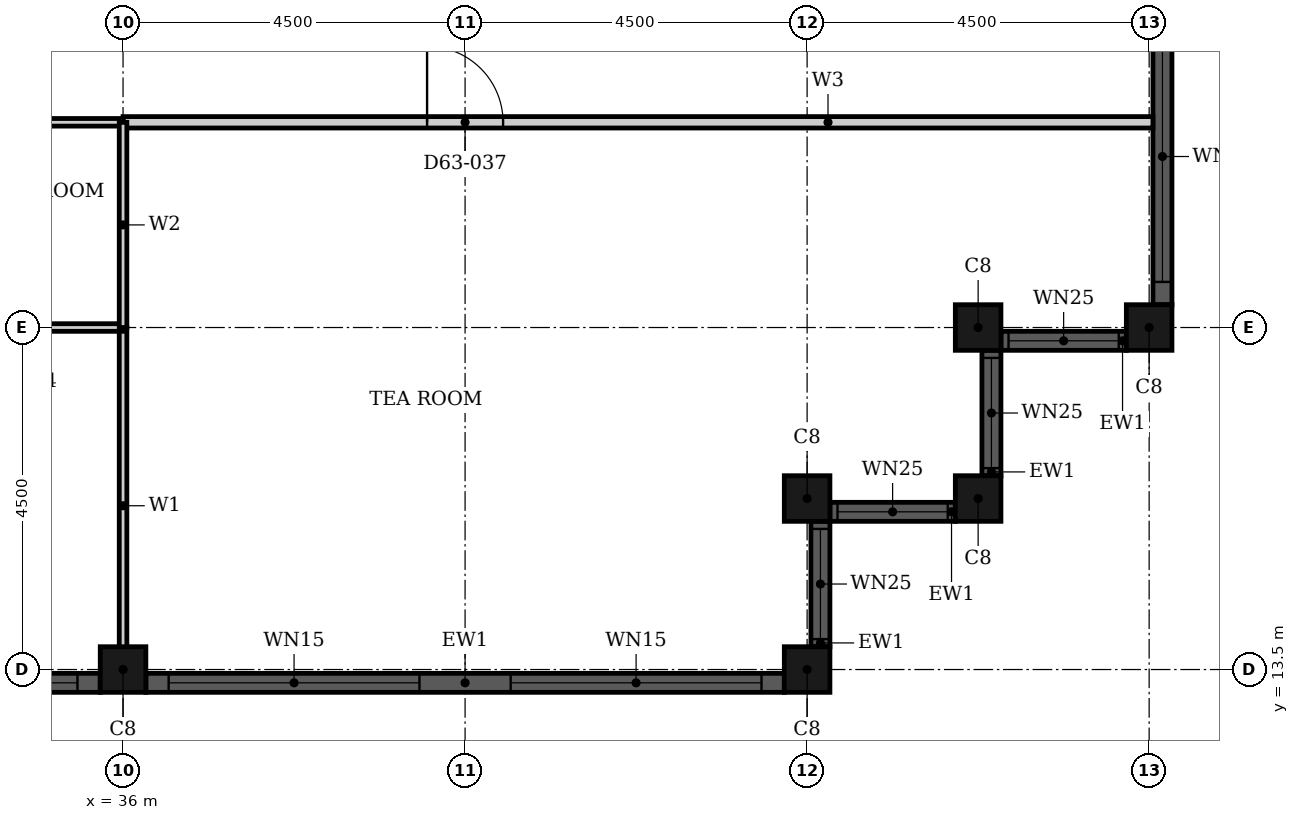
"""IFC4 building model, lengths in metres.
Left out: names, types, materials, properties, quantities, classifications, styles, units other than length and angle.
Written with IfcOpenShell. Run it as: python <this file> out.ifc"""

import sys

from ifc_helpers import new_model, si_unit, direction, frame, frame_2d, origin, origin_2d, place, context, subcontext, project, spatial, rectangle, hollow_rectangle, extrude, element, fill, save


model = new_model("IFC4")
c1 = context("Model", 3, precision=1e-05, world=origin(), true_north=direction((0.0, 1.0)))
c2 = subcontext(c1, "Body", "Model", "MODEL_VIEW")
j1 = project(units=[si_unit("LENGTHUNIT", "METRE"), si_unit("PLANEANGLEUNIT", "RADIAN")], contexts=[c1])
p1 = place(None, origin())
s1 = spatial("IfcSite", under=j1, at=p1, CompositionType="ELEMENT")
p2 = place(p1, origin())
s2 = spatial("IfcBuilding", under=s1, at=p2, CompositionType="ELEMENT")
p3 = place(p2, frame((0.0, 0.0, 249.0)))
s3 = spatial("IfcBuildingStorey", under=s2, at=p3, CompositionType="ELEMENT", Elevation=249.0)
for number, where, z_axis, x_axis in (
    (1, (36.0, 13.5, 0.0), (0.0, 0.0, 1.0), (1.0, 0.0, 0.0)),
    (2, (45.0, 13.5, 0.0), (0.0, 0.0, 1.0), (1.0, 0.0, 0.0)),
    (3, (45.0, 15.75, 0.0), (0.0, 0.0, 1.0), (1.0, 0.0, 0.0)),
    (4, (47.25, 15.75, 0.0), (0.0, 0.0, 1.0), (1.0, 0.0, 0.0)),
    (5, (47.25, 18.0, 0.0), (0.0, 0.0, 1.0), (1.0, 0.0, 0.0)),
    (6, (49.5, 18.0, 0.0), (0.0, 0.0, 1.0), (1.0, 0.0, 0.0)),
):
    element("IfcColumn", number, at=place(p3, frame(where, z_axis=z_axis, x_axis=x_axis)), inside=s3, PredefinedType="COLUMN", context=c2, shape_type="SweptSolid", body=[
        extrude(hollow_rectangle(XDim=0.6, YDim=0.6, WallThickness=0.02, at=origin_2d()), origin(), (0.0, 0.0, 1.0), 3.7),
    ])
p4 = place(p3, frame((27.3, 13.325, 0.0), z_axis=(0.0, 0.0, 1.0), x_axis=(1.0, 0.0, 0.0)))
e7 = element("IfcWall", 7, at=p4, inside=s3, PredefinedType="SOLIDWALL", context=c2, shape_type="SweptSolid", body=[
    extrude(rectangle(XDim=8.4, YDim=0.25, at=frame_2d((4.2, 0.0))), origin(), (0.0, 0.0, 1.0), 3.7),
])
p5 = place(p4, frame((0.3, 0.0, 0.45)))
e8 = element("IfcOpeningElement", 8, at=p5, cuts=e7, PredefinedType="OPENING", context=c2, shape_type="SweptSolid", body=[
    extrude(rectangle(XDim=3.3, YDim=2.3, at=frame_2d((1.65, 1.15))), frame((0.0, 0.135, 0.0), z_axis=(0.0, -1.0, 0.0), x_axis=(1.0, 0.0, 0.0)), (0.0, 0.0, 1.0), 0.27),
])
p6 = place(p4, frame((4.8, 0.0, 0.45)))
e9 = element("IfcOpeningElement", 9, at=p6, cuts=e7, PredefinedType="OPENING", context=c2, shape_type="SweptSolid", body=[
    extrude(rectangle(XDim=3.3, YDim=2.3, at=frame_2d((1.65, 1.15))), frame((0.0, 0.135, 0.0), z_axis=(0.0, -1.0, 0.0), x_axis=(1.0, 0.0, 0.0)), (0.0, 0.0, 1.0), 0.27),
])
p7 = place(p3, frame((36.3, 13.325, 0.0), z_axis=(0.0, 0.0, 1.0), x_axis=(1.0, 0.0, 0.0)))
e10 = element("IfcWall", 10, at=p7, inside=s3, PredefinedType="SOLIDWALL", context=c2, shape_type="SweptSolid", body=[
    extrude(rectangle(XDim=8.4, YDim=0.25, at=frame_2d((4.2, 0.0))), origin(), (0.0, 0.0, 1.0), 3.7),
])
p8 = place(p7, frame((0.3, 0.0, 0.45)))
e11 = element("IfcOpeningElement", 11, at=p8, cuts=e10, PredefinedType="OPENING", context=c2, shape_type="SweptSolid", body=[
    extrude(rectangle(XDim=3.3, YDim=2.3, at=frame_2d((1.65, 1.15))), frame((0.0, 0.135, 0.0), z_axis=(0.0, -1.0, 0.0), x_axis=(1.0, 0.0, 0.0)), (0.0, 0.0, 1.0), 0.27),
])
p9 = place(p7, frame((4.8, 0.0, 0.45)))
e12 = element("IfcOpeningElement", 12, at=p9, cuts=e10, PredefinedType="OPENING", context=c2, shape_type="SweptSolid", body=[
    extrude(rectangle(XDim=3.3, YDim=2.3, at=frame_2d((1.65, 1.15))), frame((0.0, 0.135, 0.0), z_axis=(0.0, -1.0, 0.0), x_axis=(1.0, 0.0, 0.0)), (0.0, 0.0, 1.0), 0.27),
])
p10 = place(p3, frame((45.175, 13.8, 0.0), z_axis=(0.0, 0.0, 1.0), x_axis=(0.0, 1.0, 0.0)))
e13 = element("IfcWall", 13, at=p10, inside=s3, PredefinedType="SOLIDWALL", context=c2, shape_type="SweptSolid", body=[
    extrude(rectangle(XDim=1.65, YDim=0.25, at=frame_2d((0.825, 0.0))), origin(), (0.0, 0.0, 1.0), 3.7),
])
p11 = place(p10, frame((0.1, 0.0, 0.9)))
e14 = element("IfcOpeningElement", 14, at=p11, cuts=e13, PredefinedType="OPENING", context=c2, shape_type="SweptSolid", body=[
    extrude(rectangle(XDim=1.45, YDim=1.85, at=frame_2d((0.725, 0.925))), frame((0.0, 0.135, 0.0), z_axis=(0.0, -1.0, 0.0), x_axis=(1.0, 0.0, 0.0)), (0.0, 0.0, 1.0), 0.27),
])
p12 = place(p3, frame((45.3, 15.575, 0.0), z_axis=(0.0, 0.0, 1.0), x_axis=(1.0, 0.0, 0.0)))
e15 = element("IfcWall", 15, at=p12, inside=s3, PredefinedType="SOLIDWALL", context=c2, shape_type="SweptSolid", body=[
    extrude(rectangle(XDim=1.65, YDim=0.25, at=frame_2d((0.825, 0.0))), origin(), (0.0, 0.0, 1.0), 3.7),
])
p13 = place(p12, frame((0.1, 0.0, 0.9)))
e16 = element("IfcOpeningElement", 16, at=p13, cuts=e15, PredefinedType="OPENING", context=c2, shape_type="SweptSolid", body=[
    extrude(rectangle(XDim=1.45, YDim=1.85, at=frame_2d((0.725, 0.925))), frame((0.0, 0.135, 0.0), z_axis=(0.0, -1.0, 0.0), x_axis=(1.0, 0.0, 0.0)), (0.0, 0.0, 1.0), 0.27),
])
p14 = place(p3, frame((47.425, 16.05, 0.0), z_axis=(0.0, 0.0, 1.0), x_axis=(0.0, 1.0, 0.0)))
e17 = element("IfcWall", 17, at=p14, inside=s3, PredefinedType="SOLIDWALL", context=c2, shape_type="SweptSolid", body=[
    extrude(rectangle(XDim=1.65, YDim=0.25, at=frame_2d((0.825, 0.0))), origin(), (0.0, 0.0, 1.0), 3.7),
])
p15 = place(p14, frame((0.1, 0.0, 0.9)))
e18 = element("IfcOpeningElement", 18, at=p15, cuts=e17, PredefinedType="OPENING", context=c2, shape_type="SweptSolid", body=[
    extrude(rectangle(XDim=1.45, YDim=1.85, at=frame_2d((0.725, 0.925))), frame((0.0, 0.135, 0.0), z_axis=(0.0, -1.0, 0.0), x_axis=(1.0, 0.0, 0.0)), (0.0, 0.0, 1.0), 0.27),
])
p16 = place(p3, frame((47.55, 17.825, 0.0), z_axis=(0.0, 0.0, 1.0), x_axis=(1.0, 0.0, 0.0)))
e19 = element("IfcWall", 19, at=p16, inside=s3, PredefinedType="SOLIDWALL", context=c2, shape_type="SweptSolid", body=[
    extrude(rectangle(XDim=1.65, YDim=0.25, at=frame_2d((0.825, 0.0))), origin(), (0.0, 0.0, 1.0), 3.7),
])
p17 = place(p16, frame((0.1, 0.0, 0.9)))
e20 = element("IfcOpeningElement", 20, at=p17, cuts=e19, PredefinedType="OPENING", context=c2, shape_type="SweptSolid", body=[
    extrude(rectangle(XDim=1.45, YDim=1.85, at=frame_2d((0.725, 0.925))), frame((0.0, 0.135, 0.0), z_axis=(0.0, -1.0, 0.0), x_axis=(1.0, 0.0, 0.0)), (0.0, 0.0, 1.0), 0.27),
])
p18 = place(p3, frame((49.675, 18.3, 0.0), z_axis=(0.0, 0.0, 1.0), x_axis=(0.0, 1.0, 0.0)))
e21 = element("IfcWall", 21, at=p18, inside=s3, PredefinedType="SOLIDWALL", context=c2, shape_type="SweptSolid", body=[
    extrude(rectangle(XDim=8.4, YDim=0.25, at=frame_2d((4.2, 0.0))), origin(), (0.0, 0.0, 1.0), 3.7),
])
p19 = place(p18, frame((0.3, 0.0, 0.45)))
e22 = element("IfcOpeningElement", 22, at=p19, cuts=e21, PredefinedType="OPENING", context=c2, shape_type="SweptSolid", body=[
    extrude(rectangle(XDim=3.3, YDim=2.3, at=frame_2d((1.65, 1.15))), frame((0.0, 0.135, 0.0), z_axis=(0.0, -1.0, 0.0), x_axis=(1.0, 0.0, 0.0)), (0.0, 0.0, 1.0), 0.27),
])
p20 = place(p18, frame((4.8, 0.0, 0.45)))
e23 = element("IfcOpeningElement", 23, at=p20, cuts=e21, PredefinedType="OPENING", context=c2, shape_type="SweptSolid", body=[
    extrude(rectangle(XDim=3.3, YDim=2.3, at=frame_2d((1.65, 1.15))), frame((0.0, 0.135, 0.0), z_axis=(0.0, -1.0, 0.0), x_axis=(1.0, 0.0, 0.0)), (0.0, 0.0, 1.0), 0.27),
])
p21 = place(p3, frame((36.0, 20.7, 0.0), z_axis=(0.0, 0.0, 1.0), x_axis=(1.0, 0.0, 0.0)))
e24 = element("IfcWall", 24, at=p21, inside=s3, PredefinedType="PARTITIONING", context=c2, shape_type="SweptSolid", body=[
    extrude(rectangle(XDim=13.55, YDim=0.15, at=frame_2d((6.775, 0.0))), origin(), (0.0, 0.0, 1.0), 3.4),
])
p22 = place(p21, frame((4.0, 0.0, 0.0)))
e25 = element("IfcOpeningElement", 25, at=p22, cuts=e24, PredefinedType="OPENING", context=c2, shape_type="SweptSolid", body=[
    extrude(rectangle(XDim=1.0, YDim=2.1, at=frame_2d((0.5, 1.05))), frame((0.0, 0.085, 0.0), z_axis=(0.0, -1.0, 0.0), x_axis=(1.0, 0.0, 0.0)), (0.0, 0.0, 1.0), 0.17),
])
p23 = place(p3, frame((36.0, 13.31, 0.0), z_axis=(0.0, 0.0, 1.0), x_axis=(0.0, 1.0, 0.0)))
e26 = element("IfcWall", 26, at=p23, inside=s3, PredefinedType="PARTITIONING", context=c2, shape_type="SweptSolid", body=[
    extrude(rectangle(XDim=4.69, YDim=0.1, at=frame_2d((2.345, 0.0))), origin(), (0.0, 0.0, 1.0), 3.4),
])
for number, where, z_axis, x_axis in (
    (27, (33.6, 18.0, 0.0), (0.0, 0.0, 1.0), (1.0, 0.0, 0.0)),
    (28, (33.6, 20.7, 0.0), (0.0, 0.0, 1.0), (1.0, 0.0, 0.0)),
):
    element("IfcWall", number, at=place(p3, frame(where, z_axis=z_axis, x_axis=x_axis)), inside=s3, PredefinedType="PARTITIONING", context=c2, shape_type="SweptSolid", body=[
        extrude(rectangle(XDim=2.4, YDim=0.1, at=frame_2d((1.2, 0.0))), origin(), (0.0, 0.0, 1.0), 3.4),
    ])
p24 = place(p3, frame((36.0, 18.0, 0.0), z_axis=(0.0, 0.0, 1.0), x_axis=(0.0, 1.0, 0.0)))
e29 = element("IfcWall", 29, at=p24, inside=s3, PredefinedType="PARTITIONING", context=c2, shape_type="SweptSolid", body=[
    extrude(rectangle(XDim=2.7, YDim=0.1, at=frame_2d((1.35, 0.0))), origin(), (0.0, 0.0, 1.0), 3.4),
])
p25 = place(p6, origin())
e30 = element("IfcWindow", 30, at=p25, inside=s3, PartitioningType="SINGLE_PANEL", PredefinedType="WINDOW", context=c2, shape_type="SweptSolid", body=[
    extrude(rectangle(XDim=3.3, YDim=2.3, at=frame_2d((1.65, 1.15))), frame((0.0, 0.03, 0.0), z_axis=(0.0, -1.0, 0.0), x_axis=(1.0, 0.0, 0.0)), (0.0, 0.0, 1.0), 0.06),
])
fill(e9, e30)
p26 = place(p8, origin())
e31 = element("IfcWindow", 31, at=p26, inside=s3, PartitioningType="SINGLE_PANEL", PredefinedType="WINDOW", context=c2, shape_type="SweptSolid", body=[
    extrude(rectangle(XDim=3.3, YDim=2.3, at=frame_2d((1.65, 1.15))), frame((0.0, 0.03, 0.0), z_axis=(0.0, -1.0, 0.0), x_axis=(1.0, 0.0, 0.0)), (0.0, 0.0, 1.0), 0.06),
])
fill(e11, e31)
p27 = place(p9, origin())
e32 = element("IfcWindow", 32, at=p27, inside=s3, PartitioningType="SINGLE_PANEL", PredefinedType="WINDOW", context=c2, shape_type="SweptSolid", body=[
    extrude(rectangle(XDim=3.3, YDim=2.3, at=frame_2d((1.65, 1.15))), frame((0.0, 0.03, 0.0), z_axis=(0.0, -1.0, 0.0), x_axis=(1.0, 0.0, 0.0)), (0.0, 0.0, 1.0), 0.06),
])
fill(e12, e32)
p28 = place(p11, origin())
e33 = element("IfcWindow", 33, at=p28, inside=s3, PartitioningType="SINGLE_PANEL", PredefinedType="WINDOW", context=c2, shape_type="SweptSolid", body=[
    extrude(rectangle(XDim=1.45, YDim=1.85, at=frame_2d((0.725, 0.925))), frame((0.0, 0.03, 0.0), z_axis=(0.0, -1.0, 0.0), x_axis=(1.0, 0.0, 0.0)), (0.0, 0.0, 1.0), 0.06),
])
fill(e14, e33)
p29 = place(p13, origin())
e34 = element("IfcWindow", 34, at=p29, inside=s3, PartitioningType="SINGLE_PANEL", PredefinedType="WINDOW", context=c2, shape_type="SweptSolid", body=[
    extrude(rectangle(XDim=1.45, YDim=1.85, at=frame_2d((0.725, 0.925))), frame((0.0, 0.03, 0.0), z_axis=(0.0, -1.0, 0.0), x_axis=(1.0, 0.0, 0.0)), (0.0, 0.0, 1.0), 0.06),
])
fill(e16, e34)
p30 = place(p15, origin())
e35 = element("IfcWindow", 35, at=p30, inside=s3, PartitioningType="SINGLE_PANEL", PredefinedType="WINDOW", context=c2, shape_type="SweptSolid", body=[
    extrude(rectangle(XDim=1.45, YDim=1.85, at=frame_2d((0.725, 0.925))), frame((0.0, 0.03, 0.0), z_axis=(0.0, -1.0, 0.0), x_axis=(1.0, 0.0, 0.0)), (0.0, 0.0, 1.0), 0.06),
])
fill(e18, e35)
p31 = place(p17, origin())
e36 = element("IfcWindow", 36, at=p31, inside=s3, PartitioningType="SINGLE_PANEL", PredefinedType="WINDOW", context=c2, shape_type="SweptSolid", body=[
    extrude(rectangle(XDim=1.45, YDim=1.85, at=frame_2d((0.725, 0.925))), frame((0.0, 0.03, 0.0), z_axis=(0.0, -1.0, 0.0), x_axis=(1.0, 0.0, 0.0)), (0.0, 0.0, 1.0), 0.06),
])
fill(e20, e36)
p32 = place(p19, origin())
e37 = element("IfcWindow", 37, at=p32, inside=s3, PartitioningType="SINGLE_PANEL", PredefinedType="WINDOW", context=c2, shape_type="SweptSolid", body=[
    extrude(rectangle(XDim=3.3, YDim=2.3, at=frame_2d((1.65, 1.15))), frame((0.0, 0.03, 0.0), z_axis=(0.0, -1.0, 0.0), x_axis=(1.0, 0.0, 0.0)), (0.0, 0.0, 1.0), 0.06),
])
fill(e22, e37)
p33 = place(p22, origin())
e38 = element("IfcDoor", 38, at=p33, inside=s3, OperationType="SINGLE_SWING_RIGHT", PredefinedType="DOOR", context=c2, shape_type="SweptSolid", body=[
    extrude(rectangle(XDim=1.0, YDim=2.1, at=frame_2d((0.5, 1.05))), frame((0.0, 0.025, 0.0), z_axis=(0.0, -1.0, 0.0), x_axis=(1.0, 0.0, 0.0)), (0.0, 0.0, 1.0), 0.05),
])
fill(e25, e38)
save(model, sys.argv[1])
